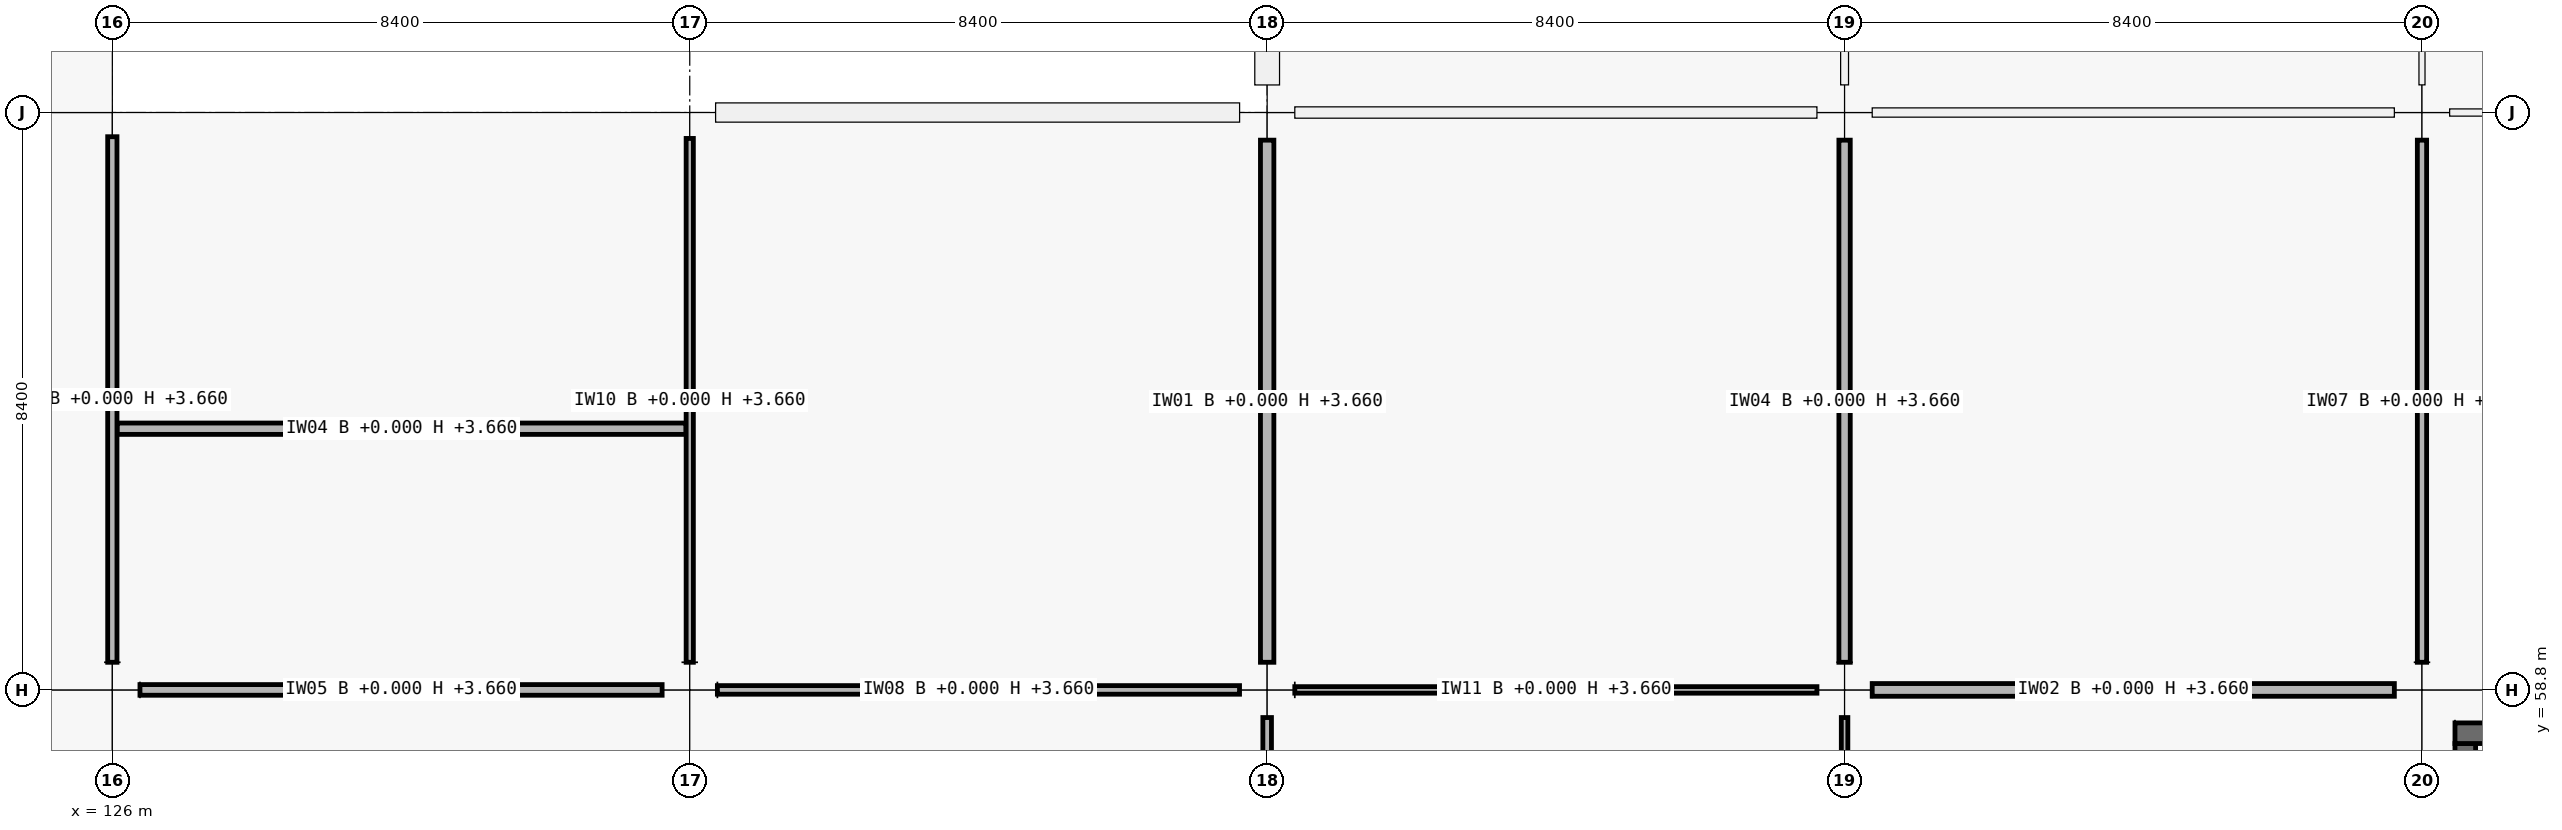
"""IFC4 building model, lengths in metres.
Left out: names, types, materials, properties, quantities, classifications, styles, units other than length and angle.
Written with IfcOpenShell. Run it as: python <this file> out.ifc"""

import sys

from ifc_helpers import new_model, si_unit, direction, frame, frame_2d, origin, origin_2d, place, context, subcontext, project, spatial, rectangle, extrude, element, fill, save


model = new_model("IFC4")
c1 = context("Model", 3, precision=1e-05, world=origin(), true_north=direction((0.0, 1.0)))
c2 = subcontext(c1, "Body", "Model", "MODEL_VIEW")
j1 = project(units=[si_unit("LENGTHUNIT", "METRE"), si_unit("PLANEANGLEUNIT", "RADIAN")], contexts=[c1])
p1 = place(None, origin())
s1 = spatial("IfcSite", under=j1, at=p1, CompositionType="ELEMENT")
p2 = place(p1, origin())
s2 = spatial("IfcBuilding", under=s1, at=p2, CompositionType="ELEMENT")
p3 = place(p2, origin())
s3 = spatial("IfcBuildingStorey", under=s2, at=p3, CompositionType="ELEMENT", Elevation=0.0)
p4 = place(p3, frame((126.0, 58.8, 0.0), z_axis=(0.0, 0.0, 1.0), x_axis=(1.0, 0.0, 0.0)))
e1 = element("IfcColumn", 1, at=p4, inside=s3, PredefinedType="COLUMN", context=c2, shape_type="SweptSolid", body=[
    extrude(rectangle(XDim=0.8, YDim=0.8, at=origin_2d()), origin(), (0.0, 0.0, 1.0), 5.76),
])
p5 = place(p3, frame((126.0, 67.2, 0.0), z_axis=(0.0, 0.0, 1.0), x_axis=(1.0, 0.0, 0.0)))
e2 = element("IfcColumn", 2, at=p5, inside=s3, PredefinedType="COLUMN", context=c2, shape_type="SweptSolid", body=[
    extrude(rectangle(XDim=0.7, YDim=0.7, at=origin_2d()), origin(), (0.0, 0.0, 1.0), 5.76),
])
p6 = place(p3, frame((134.4, 58.8, 0.0), z_axis=(0.0, 0.0, 1.0), x_axis=(1.0, 0.0, 0.0)))
e3 = element("IfcColumn", 3, at=p6, inside=s3, PredefinedType="COLUMN", context=c2, shape_type="SweptSolid", body=[
    extrude(rectangle(XDim=0.8, YDim=0.8, at=origin_2d()), origin(), (0.0, 0.0, 1.0), 5.76),
])
p7 = place(p3, frame((134.4, 67.2, 0.0), z_axis=(0.0, 0.0, 1.0), x_axis=(1.0, 0.0, 0.0)))
e4 = element("IfcColumn", 4, at=p7, inside=s3, PredefinedType="COLUMN", context=c2, shape_type="SweptSolid", body=[
    extrude(rectangle(XDim=0.75, YDim=0.75, at=origin_2d()), origin(), (0.0, 0.0, 1.0), 5.76),
])
for number, where, z_axis, x_axis in (
    (5, (142.8, 58.8, 0.0), (0.0, 0.0, 1.0), (1.0, 0.0, 0.0)),
    (6, (142.8, 67.2, 0.0), (0.0, 0.0, 1.0), (1.0, 0.0, 0.0)),
    (7, (151.2, 58.8, 0.0), (0.0, 0.0, 1.0), (1.0, 0.0, 0.0)),
    (8, (151.2, 67.2, 0.0), (0.0, 0.0, 1.0), (1.0, 0.0, 0.0)),
    (9, (159.6, 58.8, 0.0), (0.0, 0.0, 1.0), (1.0, 0.0, 0.0)),
    (10, (159.6, 67.2, 0.0), (0.0, 0.0, 1.0), (1.0, 0.0, 0.0)),
):
    element("IfcColumn", number, at=place(p3, frame(where, z_axis=z_axis, x_axis=x_axis)), inside=s3, PredefinedType="COLUMN", context=c2, shape_type="SweptSolid", body=[
        extrude(rectangle(XDim=0.8, YDim=0.8, at=origin_2d()), origin(), (0.0, 0.0, 1.0), 5.76),
    ])
p8 = place(p3, frame((134.776, 67.2, 0.0), z_axis=(0.0, 0.0, 1.0), x_axis=(1.0, 0.0, 0.0)))
e11 = element("IfcWall", 11, at=p8, inside=s3, PredefinedType="SOLIDWALL", context=c2, shape_type="SweptSolid", body=[
    extrude(rectangle(XDim=7.623, YDim=0.28, at=frame_2d((3.812, 0.0))), origin(), (0.0, 0.0, 1.0), 4.7),
])
p9 = place(p8, frame((2.537, 0.0, 0.9)))
e12 = element("IfcOpeningElement", 12, at=p9, cuts=e11, PredefinedType="OPENING", context=c2, shape_type="SweptSolid", body=[
    extrude(rectangle(XDim=2.55, YDim=1.95, at=frame_2d((1.275, 0.975))), frame((0.0, 0.14, 0.0), z_axis=(0.0, -1.0, 0.0), x_axis=(1.0, 0.0, 0.0)), (0.0, 0.0, 1.0), 0.28),
])
p10 = place(p3, frame((142.8, 67.601, 0.0), z_axis=(0.0, 0.0, 1.0), x_axis=(0.0, 1.0, 0.0)))
e13 = element("IfcWall", 13, at=p10, inside=s3, PredefinedType="SOLIDWALL", context=c2, shape_type="SweptSolid", body=[
    extrude(rectangle(XDim=7.673, YDim=0.36, at=frame_2d((3.836, 0.0))), origin(), (0.0, 0.0, 1.0), 4.7),
])
p11 = place(p10, frame((2.937, 0.0, 0.9)))
e14 = element("IfcOpeningElement", 14, at=p11, cuts=e13, PredefinedType="OPENING", context=c2, shape_type="SweptSolid", body=[
    extrude(rectangle(XDim=1.8, YDim=1.8, at=frame_2d((0.9, 0.9))), frame((0.0, 0.18, 0.0), z_axis=(0.0, -1.0, 0.0), x_axis=(1.0, 0.0, 0.0)), (0.0, 0.0, 1.0), 0.36),
])
p12 = place(p3, frame((160.23, 51.18, 0.0), z_axis=(0.0, 0.0, 1.0), x_axis=(0.0, 1.0, 0.0)))
e15 = element("IfcWall", 15, at=p12, inside=s3, PredefinedType="SHEAR", context=c2, shape_type="SweptSolid", body=[
    extrude(rectangle(XDim=6.84, YDim=0.3, at=frame_2d((3.42, 0.0))), origin(), (0.0, 0.0, 1.0), 5.76),
])
p13 = place(p3, frame((160.08, 58.17, 0.0), z_axis=(0.0, 0.0, 1.0), x_axis=(1.0, 0.0, 0.0)))
e16 = element("IfcWall", 16, at=p13, inside=s3, PredefinedType="SHEAR", context=c2, shape_type="SweptSolid", body=[
    extrude(rectangle(XDim=7.44, YDim=0.3, at=frame_2d((3.72, 0.0))), origin(), (0.0, 0.0, 1.0), 5.76),
])
p14 = place(p3, frame((126.402, 58.8, 0.0), z_axis=(0.0, 0.0, 1.0), x_axis=(1.0, 0.0, 0.0)))
e17 = element("IfcWall", 17, at=p14, inside=s3, PredefinedType="PARTITIONING", context=c2, shape_type="SweptSolid", body=[
    extrude(rectangle(XDim=7.596, YDim=0.155, at=frame_2d((3.798, 0.0))), origin(), (0.0, 0.0, 1.0), 3.66),
])
p15 = place(p3, frame((134.802, 58.8, 0.0), z_axis=(0.0, 0.0, 1.0), x_axis=(1.0, 0.0, 0.0)))
e18 = element("IfcWall", 18, at=p15, inside=s3, PredefinedType="PARTITIONING", context=c2, shape_type="SweptSolid", body=[
    extrude(rectangle(XDim=7.596, YDim=0.125, at=frame_2d((3.798, 0.0))), origin(), (0.0, 0.0, 1.0), 3.66),
])
p16 = place(p15, frame((3.293, 0.0, 0.0)))
e19 = element("IfcOpeningElement", 19, at=p16, cuts=e18, PredefinedType="OPENING", context=c2, shape_type="SweptSolid", body=[
    extrude(rectangle(XDim=1.01, YDim=2.12, at=frame_2d((0.505, 1.06))), frame((0.0, 0.062, 0.0), z_axis=(0.0, -1.0, 0.0), x_axis=(1.0, 0.0, 0.0)), (0.0, 0.0, 1.0), 0.125),
])
p17 = place(p3, frame((143.202, 58.8, 0.0), z_axis=(0.0, 0.0, 1.0), x_axis=(1.0, 0.0, 0.0)))
e20 = element("IfcWall", 20, at=p17, inside=s3, PredefinedType="PARTITIONING", context=c2, shape_type="SweptSolid", body=[
    extrude(rectangle(XDim=7.596, YDim=0.095, at=frame_2d((3.798, 0.0))), origin(), (0.0, 0.0, 1.0), 3.66),
])
p18 = place(p3, frame((143.202, 67.2, 0.0), z_axis=(0.0, 0.0, 1.0), x_axis=(1.0, 0.0, 0.0)))
e21 = element("IfcWall", 21, at=p18, inside=s3, PredefinedType="PARTITIONING", context=c2, shape_type="SweptSolid", body=[
    extrude(rectangle(XDim=7.596, YDim=0.165, at=frame_2d((3.798, 0.0))), origin(), (0.0, 0.0, 1.0), 3.66),
])
p19 = place(p18, frame((3.278, 0.0, 0.0)))
e22 = element("IfcOpeningElement", 22, at=p19, cuts=e21, PredefinedType="OPENING", context=c2, shape_type="SweptSolid", body=[
    extrude(rectangle(XDim=1.04, YDim=2.2, at=frame_2d((0.52, 1.1))), frame((0.0, 0.083, 0.0), z_axis=(0.0, -1.0, 0.0), x_axis=(1.0, 0.0, 0.0)), (0.0, 0.0, 1.0), 0.165),
])
p20 = place(p3, frame((151.602, 58.8, 0.0), z_axis=(0.0, 0.0, 1.0), x_axis=(1.0, 0.0, 0.0)))
e23 = element("IfcWall", 23, at=p20, inside=s3, PredefinedType="PARTITIONING", context=c2, shape_type="SweptSolid", body=[
    extrude(rectangle(XDim=7.596, YDim=0.185, at=frame_2d((3.798, 0.0))), origin(), (0.0, 0.0, 1.0), 3.66),
])
p21 = place(p20, frame((3.318, 0.0, 0.0)))
e24 = element("IfcOpeningElement", 24, at=p21, cuts=e23, PredefinedType="OPENING", context=c2, shape_type="SweptSolid", body=[
    extrude(rectangle(XDim=0.96, YDim=2.18, at=frame_2d((0.48, 1.09))), frame((0.0, 0.093, 0.0), z_axis=(0.0, -1.0, 0.0), x_axis=(1.0, 0.0, 0.0)), (0.0, 0.0, 1.0), 0.185),
])
p22 = place(p3, frame((151.602, 67.2, 0.0), z_axis=(0.0, 0.0, 1.0), x_axis=(1.0, 0.0, 0.0)))
e25 = element("IfcWall", 25, at=p22, inside=s3, PredefinedType="PARTITIONING", context=c2, shape_type="SweptSolid", body=[
    extrude(rectangle(XDim=7.596, YDim=0.135, at=frame_2d((3.798, 0.0))), origin(), (0.0, 0.0, 1.0), 3.66),
])
p23 = place(p22, frame((3.328, 0.0, 0.0)))
e26 = element("IfcOpeningElement", 26, at=p23, cuts=e25, PredefinedType="OPENING", context=c2, shape_type="SweptSolid", body=[
    extrude(rectangle(XDim=0.94, YDim=2.15, at=frame_2d((0.47, 1.075))), frame((0.0, 0.067, 0.0), z_axis=(0.0, -1.0, 0.0), x_axis=(1.0, 0.0, 0.0)), (0.0, 0.0, 1.0), 0.135),
])
p24 = place(p3, frame((160.002, 67.2, 0.0), z_axis=(0.0, 0.0, 1.0), x_axis=(1.0, 0.0, 0.0)))
e27 = element("IfcWall", 27, at=p24, inside=s3, PredefinedType="PARTITIONING", context=c2, shape_type="SweptSolid", body=[
    extrude(rectangle(XDim=7.596, YDim=0.105, at=frame_2d((3.798, 0.0))), origin(), (0.0, 0.0, 1.0), 3.66),
])
p25 = place(p24, frame((3.273, 0.0, 0.0)))
e28 = element("IfcOpeningElement", 28, at=p25, cuts=e27, PredefinedType="OPENING", context=c2, shape_type="SweptSolid", body=[
    extrude(rectangle(XDim=1.05, YDim=2.12, at=frame_2d((0.525, 1.06))), frame((0.0, 0.052, 0.0), z_axis=(0.0, -1.0, 0.0), x_axis=(1.0, 0.0, 0.0)), (0.0, 0.0, 1.0), 0.105),
])
p26 = place(p3, frame((126.0, 59.202, 0.0), z_axis=(0.0, 0.0, 1.0), x_axis=(0.0, 1.0, 0.0)))
e29 = element("IfcWall", 29, at=p26, inside=s3, PredefinedType="PARTITIONING", context=c2, shape_type="SweptSolid", body=[
    extrude(rectangle(XDim=7.646, YDim=0.135, at=frame_2d((3.823, 0.0))), origin(), (0.0, 0.0, 1.0), 3.66),
])
p27 = place(p26, frame((1.153, 0.0, 0.0)))
e30 = element("IfcOpeningElement", 30, at=p27, cuts=e29, PredefinedType="OPENING", context=c2, shape_type="SweptSolid", body=[
    extrude(rectangle(XDim=0.97, YDim=2.12, at=frame_2d((0.485, 1.06))), frame((0.0, 0.067, 0.0), z_axis=(0.0, -1.0, 0.0), x_axis=(1.0, 0.0, 0.0)), (0.0, 0.0, 1.0), 0.135),
])
p28 = place(p26, frame((5.093, 0.0, 0.0)))
e31 = element("IfcOpeningElement", 31, at=p28, cuts=e29, PredefinedType="OPENING", context=c2, shape_type="SweptSolid", body=[
    extrude(rectangle(XDim=0.93, YDim=2.12, at=frame_2d((0.465, 1.06))), frame((0.0, 0.067, 0.0), z_axis=(0.0, -1.0, 0.0), x_axis=(1.0, 0.0, 0.0)), (0.0, 0.0, 1.0), 0.135),
])
p29 = place(p3, frame((134.4, 59.202, 0.0), z_axis=(0.0, 0.0, 1.0), x_axis=(0.0, 1.0, 0.0)))
e32 = element("IfcWall", 32, at=p29, inside=s3, PredefinedType="PARTITIONING", context=c2, shape_type="SweptSolid", body=[
    extrude(rectangle(XDim=7.621, YDim=0.105, at=frame_2d((3.811, 0.0))), origin(), (0.0, 0.0, 1.0), 3.66),
])
p30 = place(p3, frame((142.8, 50.802, 0.0), z_axis=(0.0, 0.0, 1.0), x_axis=(0.0, 1.0, 0.0)))
e33 = element("IfcWall", 33, at=p30, inside=s3, PredefinedType="PARTITIONING", context=c2, shape_type="SweptSolid", body=[
    extrude(rectangle(XDim=7.596, YDim=0.125, at=frame_2d((3.798, 0.0))), origin(), (0.0, 0.0, 1.0), 3.66),
])
p31 = place(p30, frame((0.593, 0.0, 0.0)))
e34 = element("IfcOpeningElement", 34, at=p31, cuts=e33, PredefinedType="OPENING", context=c2, shape_type="SweptSolid", body=[
    extrude(rectangle(XDim=0.94, YDim=2.08, at=frame_2d((0.47, 1.04))), frame((0.0, 0.062, 0.0), z_axis=(0.0, -1.0, 0.0), x_axis=(1.0, 0.0, 0.0)), (0.0, 0.0, 1.0), 0.125),
])
p32 = place(p30, frame((4.503, 0.0, 0.0)))
e35 = element("IfcOpeningElement", 35, at=p32, cuts=e33, PredefinedType="OPENING", context=c2, shape_type="SweptSolid", body=[
    extrude(rectangle(XDim=0.96, YDim=2.1, at=frame_2d((0.48, 1.05))), frame((0.0, 0.062, 0.0), z_axis=(0.0, -1.0, 0.0), x_axis=(1.0, 0.0, 0.0)), (0.0, 0.0, 1.0), 0.125),
])
p33 = place(p3, frame((142.8, 59.202, 0.0), z_axis=(0.0, 0.0, 1.0), x_axis=(0.0, 1.0, 0.0)))
e36 = element("IfcWall", 36, at=p33, inside=s3, PredefinedType="PARTITIONING", context=c2, shape_type="SweptSolid", body=[
    extrude(rectangle(XDim=7.596, YDim=0.195, at=frame_2d((3.798, 0.0))), origin(), (0.0, 0.0, 1.0), 3.66),
])
p34 = place(p33, frame((3.268, 0.0, 0.0)))
e37 = element("IfcOpeningElement", 37, at=p34, cuts=e36, PredefinedType="OPENING", context=c2, shape_type="SweptSolid", body=[
    extrude(rectangle(XDim=1.06, YDim=2.25, at=frame_2d((0.53, 1.125))), frame((0.0, 0.098, 0.0), z_axis=(0.0, -1.0, 0.0), x_axis=(1.0, 0.0, 0.0)), (0.0, 0.0, 1.0), 0.195),
])
p35 = place(p3, frame((151.2, 50.802, 0.0), z_axis=(0.0, 0.0, 1.0), x_axis=(0.0, 1.0, 0.0)))
e38 = element("IfcWall", 38, at=p35, inside=s3, PredefinedType="PARTITIONING", context=c2, shape_type="SweptSolid", body=[
    extrude(rectangle(XDim=7.596, YDim=0.095, at=frame_2d((3.798, 0.0))), origin(), (0.0, 0.0, 1.0), 3.66),
])
p36 = place(p3, frame((151.2, 59.202, 0.0), z_axis=(0.0, 0.0, 1.0), x_axis=(0.0, 1.0, 0.0)))
e39 = element("IfcWall", 39, at=p36, inside=s3, PredefinedType="PARTITIONING", context=c2, shape_type="SweptSolid", body=[
    extrude(rectangle(XDim=7.596, YDim=0.165, at=frame_2d((3.798, 0.0))), origin(), (0.0, 0.0, 1.0), 3.66),
])
p37 = place(p36, frame((3.318, 0.0, 0.0)))
e40 = element("IfcOpeningElement", 40, at=p37, cuts=e39, PredefinedType="OPENING", context=c2, shape_type="SweptSolid", body=[
    extrude(rectangle(XDim=0.96, YDim=2.18, at=frame_2d((0.48, 1.09))), frame((0.0, 0.083, 0.0), z_axis=(0.0, -1.0, 0.0), x_axis=(1.0, 0.0, 0.0)), (0.0, 0.0, 1.0), 0.165),
])
p38 = place(p3, frame((151.2, 67.602, 0.0), z_axis=(0.0, 0.0, 1.0), x_axis=(0.0, 1.0, 0.0)))
e41 = element("IfcWall", 41, at=p38, inside=s3, PredefinedType="PARTITIONING", context=c2, shape_type="SweptSolid", body=[
    extrude(rectangle(XDim=7.696, YDim=0.115, at=frame_2d((3.848, 0.0))), origin(), (0.0, 0.0, 1.0), 3.66),
])
p39 = place(p38, frame((3.378, 0.0, 0.0)))
e42 = element("IfcOpeningElement", 42, at=p39, cuts=e41, PredefinedType="OPENING", context=c2, shape_type="SweptSolid", body=[
    extrude(rectangle(XDim=0.94, YDim=2.15, at=frame_2d((0.47, 1.075))), frame((0.0, 0.058, 0.0), z_axis=(0.0, -1.0, 0.0), x_axis=(1.0, 0.0, 0.0)), (0.0, 0.0, 1.0), 0.115),
])
p40 = place(p3, frame((159.6, 59.202, 0.0), z_axis=(0.0, 0.0, 1.0), x_axis=(0.0, 1.0, 0.0)))
e43 = element("IfcWall", 43, at=p40, inside=s3, PredefinedType="PARTITIONING", context=c2, shape_type="SweptSolid", body=[
    extrude(rectangle(XDim=7.596, YDim=0.135, at=frame_2d((3.798, 0.0))), origin(), (0.0, 0.0, 1.0), 3.66),
])
p41 = place(p40, frame((3.288, 0.0, 0.0)))
e44 = element("IfcOpeningElement", 44, at=p41, cuts=e43, PredefinedType="OPENING", context=c2, shape_type="SweptSolid", body=[
    extrude(rectangle(XDim=1.02, YDim=2.2, at=frame_2d((0.51, 1.1))), frame((0.0, 0.067, 0.0), z_axis=(0.0, -1.0, 0.0), x_axis=(1.0, 0.0, 0.0)), (0.0, 0.0, 1.0), 0.135),
])
p42 = place(p3, frame((159.6, 67.602, 0.0), z_axis=(0.0, 0.0, 1.0), x_axis=(0.0, 1.0, 0.0)))
e45 = element("IfcWall", 45, at=p42, inside=s3, PredefinedType="PARTITIONING", context=c2, shape_type="SweptSolid", body=[
    extrude(rectangle(XDim=7.671, YDim=0.088, at=frame_2d((3.835, 0.0))), origin(), (0.0, 0.0, 1.0), 3.66),
])
p43 = place(p42, frame((3.331, 0.0, 0.0)))
e46 = element("IfcOpeningElement", 46, at=p43, cuts=e45, PredefinedType="OPENING", context=c2, shape_type="SweptSolid", body=[
    extrude(rectangle(XDim=1.01, YDim=2.12, at=frame_2d((0.505, 1.06))), frame((0.0, 0.044, 0.0), z_axis=(0.0, -1.0, 0.0), x_axis=(1.0, 0.0, 0.0)), (0.0, 0.0, 1.0), 0.088),
])
p44 = place(p3, frame((126.07, 62.6, 0.0), z_axis=(0.0, 0.0, 1.0), x_axis=(1.0, 0.0, 0.0)))
e47 = element("IfcWall", 47, at=p44, inside=s3, PredefinedType="PARTITIONING", context=c2, shape_type="SweptSolid", body=[
    extrude(rectangle(XDim=8.276, YDim=0.165, at=frame_2d((4.138, 0.0))), origin(), (0.0, 0.0, 1.0), 3.66),
])
p45 = place(p9, origin())
e48 = element("IfcWindow", 48, at=p45, inside=s3, PartitioningType="SINGLE_PANEL", PredefinedType="WINDOW", context=c2, shape_type="SweptSolid", body=[
    extrude(rectangle(XDim=2.55, YDim=1.95, at=frame_2d((1.275, 0.975))), frame((0.0, 0.03, 0.0), z_axis=(0.0, -1.0, 0.0), x_axis=(1.0, 0.0, 0.0)), (0.0, 0.0, 1.0), 0.06),
])
fill(e12, e48)
p46 = place(p27, origin())
e49 = element("IfcDoor", 49, at=p46, inside=s3, OperationType="SINGLE_SWING_LEFT", PredefinedType="DOOR", context=c2, shape_type="SweptSolid", body=[
    extrude(rectangle(XDim=0.97, YDim=2.12, at=frame_2d((0.485, 1.06))), frame((0.0, 0.025, 0.0), z_axis=(0.0, -1.0, 0.0), x_axis=(1.0, 0.0, 0.0)), (0.0, 0.0, 1.0), 0.05),
])
fill(e30, e49)
p47 = place(p28, origin())
e50 = element("IfcDoor", 50, at=p47, inside=s3, OperationType="SINGLE_SWING_RIGHT", PredefinedType="DOOR", context=c2, shape_type="SweptSolid", body=[
    extrude(rectangle(XDim=0.93, YDim=2.12, at=frame_2d((0.465, 1.06))), frame((0.0, 0.025, 0.0), z_axis=(0.0, -1.0, 0.0), x_axis=(1.0, 0.0, 0.0)), (0.0, 0.0, 1.0), 0.05),
])
fill(e31, e50)
p48 = place(p16, origin())
e51 = element("IfcDoor", 51, at=p48, inside=s3, OperationType="SINGLE_SWING_LEFT", PredefinedType="DOOR", context=c2, shape_type="SweptSolid", body=[
    extrude(rectangle(XDim=1.01, YDim=2.12, at=frame_2d((0.505, 1.06))), frame((0.0, 0.025, 0.0), z_axis=(0.0, -1.0, 0.0), x_axis=(1.0, 0.0, 0.0)), (0.0, 0.0, 1.0), 0.05),
])
fill(e19, e51)
p49 = place(p19, origin())
e52 = element("IfcDoor", 52, at=p49, inside=s3, OperationType="SINGLE_SWING_LEFT", PredefinedType="DOOR", context=c2, shape_type="SweptSolid", body=[
    extrude(rectangle(XDim=1.04, YDim=2.2, at=frame_2d((0.52, 1.1))), frame((0.0, 0.025, 0.0), z_axis=(0.0, -1.0, 0.0), x_axis=(1.0, 0.0, 0.0)), (0.0, 0.0, 1.0), 0.05),
])
fill(e22, e52)
p50 = place(p21, origin())
e53 = element("IfcDoor", 53, at=p50, inside=s3, OperationType="SINGLE_SWING_LEFT", PredefinedType="DOOR", context=c2, shape_type="SweptSolid", body=[
    extrude(rectangle(XDim=0.96, YDim=2.18, at=frame_2d((0.48, 1.09))), frame((0.0, 0.025, 0.0), z_axis=(0.0, -1.0, 0.0), x_axis=(1.0, 0.0, 0.0)), (0.0, 0.0, 1.0), 0.05),
])
fill(e24, e53)
p51 = place(p23, origin())
e54 = element("IfcDoor", 54, at=p51, inside=s3, OperationType="SINGLE_SWING_RIGHT", PredefinedType="DOOR", context=c2, shape_type="SweptSolid", body=[
    extrude(rectangle(XDim=0.94, YDim=2.15, at=frame_2d((0.47, 1.075))), frame((0.0, 0.025, 0.0), z_axis=(0.0, -1.0, 0.0), x_axis=(1.0, 0.0, 0.0)), (0.0, 0.0, 1.0), 0.05),
])
fill(e26, e54)
p52 = place(p34, origin())
e55 = element("IfcDoor", 55, at=p52, inside=s3, OperationType="SINGLE_SWING_LEFT", PredefinedType="DOOR", context=c2, shape_type="SweptSolid", body=[
    extrude(rectangle(XDim=1.06, YDim=2.25, at=frame_2d((0.53, 1.125))), frame((0.0, 0.025, 0.0), z_axis=(0.0, -1.0, 0.0), x_axis=(1.0, 0.0, 0.0)), (0.0, 0.0, 1.0), 0.05),
])
fill(e37, e55)
p53 = place(p41, origin())
e56 = element("IfcDoor", 56, at=p53, inside=s3, OperationType="SINGLE_SWING_LEFT", PredefinedType="DOOR", context=c2, shape_type="SweptSolid", body=[
    extrude(rectangle(XDim=1.02, YDim=2.2, at=frame_2d((0.51, 1.1))), frame((0.0, 0.025, 0.0), z_axis=(0.0, -1.0, 0.0), x_axis=(1.0, 0.0, 0.0)), (0.0, 0.0, 1.0), 0.05),
])
fill(e44, e56)
p54 = place(p37, origin())
e57 = element("IfcDoor", 57, at=p54, inside=s3, OperationType="SINGLE_SWING_RIGHT", PredefinedType="DOOR", context=c2, shape_type="SweptSolid", body=[
    extrude(rectangle(XDim=0.96, YDim=2.18, at=frame_2d((0.48, 1.09))), frame((0.0, 0.025, 0.0), z_axis=(0.0, -1.0, 0.0), x_axis=(1.0, 0.0, 0.0)), (0.0, 0.0, 1.0), 0.05),
])
fill(e40, e57)
save(model, sys.argv[1])
